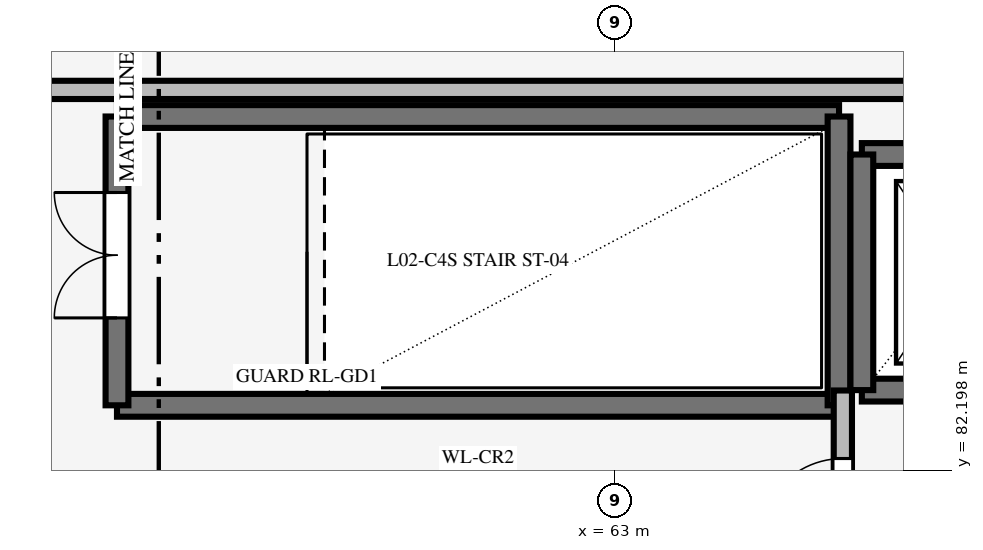
"""IFC4 building model, lengths in metres.
Left out: names, types, materials, properties, quantities, classifications, styles, units other than length and angle.
Written with IfcOpenShell. Run it as: python <this file> out.ifc"""

import sys

from ifc_helpers import new_model, si_unit, direction, frame, frame_2d, origin, place, context, subcontext, project, spatial, rectangle, extrude, element, fill, save


model = new_model("IFC4")
c1 = context("Model", 3, precision=1e-05, world=origin(), true_north=direction((0.0, 1.0)))
c2 = subcontext(c1, "Body", "Model", "MODEL_VIEW")
j1 = project(units=[si_unit("LENGTHUNIT", "METRE"), si_unit("PLANEANGLEUNIT", "RADIAN")], contexts=[c1])
p1 = place(None, origin())
s1 = spatial("IfcSite", under=j1, at=p1, CompositionType="ELEMENT")
p2 = place(p1, origin())
s2 = spatial("IfcBuilding", under=s1, at=p2, CompositionType="ELEMENT")
p3 = place(p2, frame((0.0, 0.0, 12.0)))
s3 = spatial("IfcBuildingStorey", under=s2, at=p3, CompositionType="ELEMENT", Elevation=12.0)
for number, where, z_axis, x_axis in (
    (1, (65.95, 83.05, 0.0), (0.0, 0.0, 1.0), (-1.0, 0.0, 0.0)),
    (2, (56.45, 86.85, 0.0), (0.0, 0.0, 1.0), (1.0, 0.0, 0.0)),
):
    element("IfcWall", number, at=place(p3, frame(where, z_axis=z_axis, x_axis=x_axis)), inside=s3, PredefinedType="SHEAR", context=c2, shape_type="SweptSolid", body=[
        extrude(rectangle(XDim=9.5, YDim=0.3, at=frame_2d((4.75, 0.0))), origin(), (0.0, 0.0, 1.0), 3.3),
    ])
p4 = place(p3, frame((56.45, 83.05, 0.0), z_axis=(0.0, 0.0, 1.0), x_axis=(0.0, 1.0, 0.0)))
e3 = element("IfcWall", 3, at=p4, inside=s3, PredefinedType="SHEAR", context=c2, shape_type="SweptSolid", body=[
    extrude(rectangle(XDim=3.8, YDim=0.3, at=frame_2d((1.9, 0.0))), origin(), (0.0, 0.0, 1.0), 3.3),
])
p5 = place(p4, frame((1.15, 0.0, 0.0)))
e4 = element("IfcOpeningElement", 4, at=p5, cuts=e3, PredefinedType="OPENING", context=c2, shape_type="SweptSolid", body=[
    extrude(rectangle(XDim=1.65, YDim=2.2, at=frame_2d((0.825, 1.1))), frame((0.0, 0.16, 0.0), z_axis=(0.0, -1.0, 0.0), x_axis=(1.0, 0.0, 0.0)), (0.0, 0.0, 1.0), 0.32),
])
p6 = place(p3, frame((65.95, 83.05, 0.0), z_axis=(0.0, 0.0, 1.0), x_axis=(0.0, 1.0, 0.0)))
e5 = element("IfcWall", 5, at=p6, inside=s3, PredefinedType="SHEAR", context=c2, shape_type="SweptSolid", body=[
    extrude(rectangle(XDim=3.8, YDim=0.3, at=frame_2d((1.9, 0.0))), origin(), (0.0, 0.0, 1.0), 3.3),
])
p7 = place(p3, frame((66.25, 83.25, 0.0), z_axis=(0.0, 0.0, 1.0), x_axis=(1.0, 0.0, 0.0)))
e6 = element("IfcWall", 6, at=p7, inside=s3, PredefinedType="SHEAR", context=c2, shape_type="SweptSolid", body=[
    extrude(rectangle(XDim=2.5, YDim=0.3, at=frame_2d((1.25, 0.0))), origin(), (0.0, 0.0, 1.0), 3.4),
])
p8 = place(p7, frame((0.6, 0.0, 0.0)))
e7 = element("IfcOpeningElement", 7, at=p8, cuts=e6, PredefinedType="OPENING", context=c2, shape_type="SweptSolid", body=[
    extrude(rectangle(XDim=1.3, YDim=2.2, at=frame_2d((0.65, 1.1))), frame((0.0, 0.16, 0.0), z_axis=(0.0, -1.0, 0.0), x_axis=(1.0, 0.0, 0.0)), (0.0, 0.0, 1.0), 0.32),
])
p9 = place(p3, frame((66.25, 86.35, 0.0), z_axis=(0.0, 0.0, 1.0), x_axis=(1.0, 0.0, 0.0)))
e8 = element("IfcWall", 8, at=p9, inside=s3, PredefinedType="SHEAR", context=c2, shape_type="SweptSolid", body=[
    extrude(rectangle(XDim=2.5, YDim=0.3, at=frame_2d((1.25, 0.0))), origin(), (0.0, 0.0, 1.0), 3.4),
])
p10 = place(p3, frame((66.25, 83.25, 0.0), z_axis=(0.0, 0.0, 1.0), x_axis=(0.0, 1.0, 0.0)))
e9 = element("IfcWall", 9, at=p10, inside=s3, PredefinedType="SHEAR", context=c2, shape_type="SweptSolid", body=[
    extrude(rectangle(XDim=3.1, YDim=0.3, at=frame_2d((1.55, 0.0))), origin(), (0.0, 0.0, 1.0), 3.4),
])
p11 = place(p3, frame((54.8, 87.2, 0.0), z_axis=(0.0, 0.0, 1.0), x_axis=(1.0, 0.0, 0.0)))
e10 = element("IfcWall", 10, at=p11, inside=s3, PredefinedType="STANDARD", context=c2, shape_type="SweptSolid", body=[
    extrude(rectangle(XDim=15.8, YDim=0.24, at=frame_2d((7.9, 0.0))), origin(), (0.0, 0.0, 1.0), 3.05),
])
p12 = place(p3, frame((66.0, 80.4, 0.0), z_axis=(0.0, 0.0, 1.0), x_axis=(0.0, 1.0, 0.0)))
e11 = element("IfcWall", 11, at=p12, inside=s3, PredefinedType="STANDARD", context=c2, shape_type="SweptSolid", body=[
    extrude(rectangle(XDim=2.845, YDim=0.24, at=frame_2d((1.423, 0.0))), origin(), (0.0, 0.0, 1.0), 3.05),
])
p13 = place(p12, frame((0.85, 0.0, 0.0)))
e12 = element("IfcOpeningElement", 12, at=p13, cuts=e11, PredefinedType="OPENING", context=c2, shape_type="SweptSolid", body=[
    extrude(rectangle(XDim=1.1, YDim=2.2, at=frame_2d((0.55, 1.1))), frame((0.0, 0.13, 0.0), z_axis=(0.0, -1.0, 0.0), x_axis=(1.0, 0.0, 0.0)), (0.0, 0.0, 1.0), 0.26),
])
p14 = place(p5, origin())
e13 = element("IfcDoor", 13, at=p14, inside=s3, OperationType="DOUBLE_DOOR_SINGLE_SWING", PredefinedType="DOOR", context=c2, shape_type="SweptSolid", body=[
    extrude(rectangle(XDim=1.65, YDim=2.2, at=frame_2d((0.825, 1.1))), frame((0.0, 0.025, 0.0), z_axis=(0.0, -1.0, 0.0), x_axis=(1.0, 0.0, 0.0)), (0.0, 0.0, 1.0), 0.05),
])
fill(e4, e13)
p15 = place(p13, origin())
e14 = element("IfcDoor", 14, at=p15, inside=s3, OperationType="SINGLE_SWING_LEFT", PredefinedType="DOOR", context=c2, shape_type="SweptSolid", body=[
    extrude(rectangle(XDim=1.1, YDim=2.2, at=frame_2d((0.55, 1.1))), frame((0.0, 0.025, 0.0), z_axis=(0.0, -1.0, 0.0), x_axis=(1.0, 0.0, 0.0)), (0.0, 0.0, 1.0), 0.05),
])
fill(e12, e14)
save(model, sys.argv[1])
